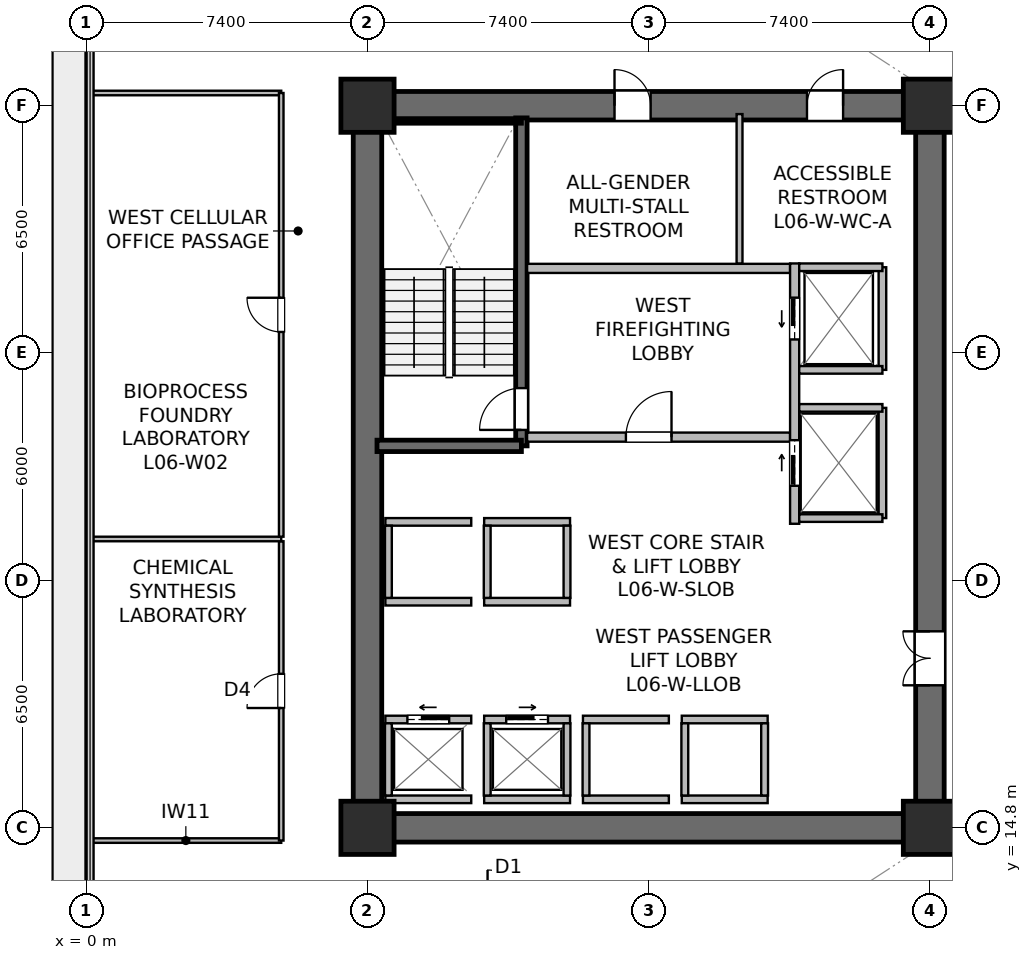
"""IFC4 building model, lengths in metres.
Left out: names, types, materials, properties, quantities, classifications, styles, units other than length and angle.
Written with IfcOpenShell. Run it as: python <this file> out.ifc"""

import sys

from ifc_helpers import new_model, si_unit, direction, frame, frame_2d, origin, origin_2d, place, context, subcontext, project, spatial, rectangle, extrude, source, transform, mapped, element, fill, save


model = new_model("IFC4")
c1 = context("Model", 3, precision=1e-05, world=origin(), true_north=direction((0.0, 1.0)))
c2 = subcontext(c1, "Body", "Model", "MODEL_VIEW")
j1 = project(units=[si_unit("LENGTHUNIT", "METRE"), si_unit("PLANEANGLEUNIT", "RADIAN")], contexts=[c1])
p1 = place(None, origin())
s1 = spatial("IfcSite", under=j1, at=p1, CompositionType="ELEMENT")
p2 = place(p1, origin())
s2 = spatial("IfcBuilding", under=s1, at=p2, CompositionType="ELEMENT")
p3 = place(p2, frame((0.0, 0.0, 25.2)))
s3 = spatial("IfcBuildingStorey", under=s2, at=p3, CompositionType="ELEMENT", Elevation=25.2)
p4 = place(p3, frame((7.025, 14.8, 0.0), z_axis=(0.0, 0.0, 1.0), x_axis=(1.0, 0.0, 0.0)))
e1 = element("IfcWall", 1, at=p4, inside=s3, PredefinedType="SHEAR", context=c2, shape_type="SweptSolid", body=[
    extrude(rectangle(XDim=15.55, YDim=0.75, at=frame_2d((7.775, 0.0))), origin(), (0.0, 0.0, 1.0), 3.78),
])
p5 = place(p3, frame((7.025, 33.8, 0.0), z_axis=(0.0, 0.0, 1.0), x_axis=(1.0, 0.0, 0.0)))
e2 = element("IfcWall", 2, at=p5, inside=s3, PredefinedType="SHEAR", context=c2, shape_type="SweptSolid", body=[
    extrude(rectangle(XDim=15.55, YDim=0.75, at=frame_2d((7.775, 0.0))), origin(), (0.0, 0.0, 1.0), 3.78),
])
p6 = place(p5, frame((6.875, 0.0, 0.0)))
e3 = element("IfcOpeningElement", 3, at=p6, cuts=e2, PredefinedType="OPENING", context=c2, shape_type="SweptSolid", body=[
    extrude(rectangle(XDim=0.95, YDim=2.15, at=frame_2d((0.475, 1.075))), frame((0.0, 0.385, 0.0), z_axis=(0.0, -1.0, 0.0), x_axis=(1.0, 0.0, 0.0)), (0.0, 0.0, 1.0), 0.77),
])
p7 = place(p5, frame((11.94, 0.0, 0.0)))
e4 = element("IfcOpeningElement", 4, at=p7, cuts=e2, PredefinedType="OPENING", context=c2, shape_type="SweptSolid", body=[
    extrude(rectangle(XDim=0.95, YDim=2.15, at=frame_2d((0.475, 1.075))), frame((0.0, 0.385, 0.0), z_axis=(0.0, -1.0, 0.0), x_axis=(1.0, 0.0, 0.0)), (0.0, 0.0, 1.0), 0.77),
])
p8 = place(p3, frame((7.4, 15.175, 0.0), z_axis=(0.0, 0.0, 1.0), x_axis=(0.0, 1.0, 0.0)))
e5 = element("IfcWall", 5, at=p8, inside=s3, PredefinedType="SHEAR", context=c2, shape_type="SweptSolid", body=[
    extrude(rectangle(XDim=18.25, YDim=0.75, at=frame_2d((9.125, 0.0))), origin(), (0.0, 0.0, 1.0), 3.78),
])
p9 = place(p3, frame((22.2, 15.175, 0.0), z_axis=(0.0, 0.0, 1.0), x_axis=(0.0, 1.0, 0.0)))
e6 = element("IfcWall", 6, at=p9, inside=s3, PredefinedType="SHEAR", context=c2, shape_type="SweptSolid", body=[
    extrude(rectangle(XDim=18.25, YDim=0.75, at=frame_2d((9.125, 0.0))), origin(), (0.0, 0.0, 1.0), 3.78),
])
p10 = place(p9, frame((3.375, 0.0, 0.0)))
e7 = element("IfcOpeningElement", 7, at=p10, cuts=e6, PredefinedType="OPENING", context=c2, shape_type="SweptSolid", body=[
    extrude(rectangle(XDim=1.42, YDim=2.2, at=frame_2d((0.71, 1.1))), frame((0.0, 0.385, 0.0), z_axis=(0.0, -1.0, 0.0), x_axis=(1.0, 0.0, 0.0)), (0.0, 0.0, 1.0), 0.77),
])
p11 = place(p3, frame((11.45, 24.85, 0.0), z_axis=(0.0, 0.0, 1.0), x_axis=(0.0, 1.0, 0.0)))
e8 = element("IfcWall", 8, at=p11, inside=s3, PredefinedType="SHEAR", context=c2, shape_type="SweptSolid", body=[
    extrude(rectangle(XDim=8.63, YDim=0.3, at=frame_2d((4.315, 0.0))), origin(), (0.0, 0.0, 1.0), 3.78),
])
p12 = place(p11, frame((0.42, 0.0, 0.0)))
e9 = element("IfcOpeningElement", 9, at=p12, cuts=e8, PredefinedType="OPENING", context=c2, shape_type="SweptSolid", body=[
    extrude(rectangle(XDim=1.1, YDim=2.15, at=frame_2d((0.55, 1.075))), frame((0.0, 0.16, 0.0), z_axis=(0.0, -1.0, 0.0), x_axis=(1.0, 0.0, 0.0)), (0.0, 0.0, 1.0), 0.32),
])
p13 = place(p3, frame((7.65, 24.85, 0.0), z_axis=(0.0, 0.0, 1.0), x_axis=(1.0, 0.0, 0.0)))
e10 = element("IfcWall", 10, at=p13, inside=s3, PredefinedType="SHEAR", context=c2, shape_type="SweptSolid", body=[
    extrude(rectangle(XDim=3.8, YDim=0.3, at=frame_2d((1.9, 0.0))), origin(), (0.0, 0.0, 1.0), 3.78),
])
p14 = place(p3, frame((7.73, 33.4, 0.0), z_axis=(0.0, 0.0, 1.0), x_axis=(1.0, 0.0, 0.0)))
e11 = element("IfcWall", 11, at=p14, inside=s3, PredefinedType="SOLIDWALL", context=c2, shape_type="SweptSolid", body=[
    extrude(rectangle(XDim=3.72, YDim=0.12, at=frame_2d((1.86, 0.0))), origin(), (0.0, 0.0, 1.0), 3.78),
])
m1 = source(origin(), c2, "Body", "SweptSolid", [
    extrude(rectangle(XDim=1.4, YDim=1.4, at=origin_2d()), origin(), (0.0, 0.0, 1.0), 4.1),
])
for number, where, z_axis, x_axis in (
    (12, (7.4, 14.8, 0.0), (0.0, 0.0, 1.0), (1.0, 0.0, 0.0)),
    (13, (22.2, 14.8, 0.0), (0.0, 0.0, 1.0), (1.0, 0.0, 0.0)),
    (14, (7.4, 33.8, 0.0), (0.0, 0.0, 1.0), (1.0, 0.0, 0.0)),
    (15, (22.2, 33.8, 0.0), (0.0, 0.0, 1.0), (1.0, 0.0, 0.0)),
):
    element("IfcColumn", number, at=place(p3, frame(where, z_axis=z_axis, x_axis=x_axis)), inside=s3, PredefinedType="COLUMN", context=c2, shape_type="MappedRepresentation", body=[
        mapped(m1, transform((0.0, 0.0, 0.0), scale=1.0)),
    ])
p15 = place(p3, frame((11.6, 25.08, 0.0), z_axis=(0.0, 0.0, 1.0), x_axis=(1.0, 0.0, 0.0)))
e16 = element("IfcWall", 16, at=p15, inside=s3, PredefinedType="SOLIDWALL", context=c2, shape_type="SweptSolid", body=[
    extrude(rectangle(XDim=6.92, YDim=0.24, at=frame_2d((3.46, 0.0))), origin(), (0.0, 0.0, 1.0), 3.065),
])
p16 = place(p15, frame((2.6, 0.0, 0.0)))
e17 = element("IfcOpeningElement", 17, at=p16, cuts=e16, PredefinedType="OPENING", context=c2, shape_type="SweptSolid", body=[
    extrude(rectangle(XDim=1.2, YDim=2.16, at=frame_2d((0.6, 1.08))), frame((0.0, 0.13, 0.0), z_axis=(0.0, -1.0, 0.0), x_axis=(1.0, 0.0, 0.0)), (0.0, 0.0, 1.0), 0.26),
])
p17 = place(p3, frame((11.6, 29.52, 0.0), z_axis=(0.0, 0.0, 1.0), x_axis=(1.0, 0.0, 0.0)))
e18 = element("IfcWall", 18, at=p17, inside=s3, PredefinedType="SOLIDWALL", context=c2, shape_type="SweptSolid", body=[
    extrude(rectangle(XDim=6.92, YDim=0.24, at=frame_2d((3.46, 0.0))), origin(), (0.0, 0.0, 1.0), 3.065),
])
p18 = place(p3, frame((18.64, 22.8, 0.0), z_axis=(0.0, 0.0, 1.0), x_axis=(0.0, 1.0, 0.0)))
e19 = element("IfcWall", 19, at=p18, inside=s3, PredefinedType="SOLIDWALL", context=c2, shape_type="SweptSolid", body=[
    extrude(rectangle(XDim=6.85, YDim=0.24, at=frame_2d((3.425, 0.0))), origin(), (0.0, 0.0, 1.0), 2.865),
])
p19 = place(p18, frame((4.85, 0.0, 0.0)))
e20 = element("IfcOpeningElement", 20, at=p19, cuts=e19, PredefinedType="OPENING", context=c2, shape_type="SweptSolid", body=[
    extrude(rectangle(XDim=1.1, YDim=2.22, at=frame_2d((0.55, 1.11))), frame((0.0, 0.13, 0.0), z_axis=(0.0, -1.0, 0.0), x_axis=(1.0, 0.0, 0.0)), (0.0, 0.0, 1.0), 0.26),
])
p20 = place(p18, frame((1.0, 0.0, 0.0)))
e21 = element("IfcOpeningElement", 21, at=p20, cuts=e19, PredefinedType="OPENING", context=c2, shape_type="SweptSolid", body=[
    extrude(rectangle(XDim=1.2, YDim=2.22, at=frame_2d((0.6, 1.11))), frame((0.0, 0.13, 0.0), z_axis=(0.0, -1.0, 0.0), x_axis=(1.0, 0.0, 0.0)), (0.0, 0.0, 1.0), 0.26),
])
p21 = place(p3, frame((7.87, 17.65, 0.0), z_axis=(0.0, 0.0, 1.0), x_axis=(1.0, 0.0, 0.0)))
e22 = element("IfcWall", 22, at=p21, inside=s3, PredefinedType="SOLIDWALL", context=c2, shape_type="SweptSolid", body=[
    extrude(rectangle(XDim=2.26, YDim=0.2, at=frame_2d((1.13, 0.0))), origin(), (0.0, 0.0, 1.0), 3.78),
])
p22 = place(p21, frame((0.58, 0.0, 0.0)))
e23 = element("IfcOpeningElement", 23, at=p22, cuts=e22, PredefinedType="OPENING", context=c2, shape_type="SweptSolid", body=[
    extrude(rectangle(XDim=1.1, YDim=2.22, at=frame_2d((0.55, 1.11))), frame((0.0, 0.11, 0.0), z_axis=(0.0, -1.0, 0.0), x_axis=(1.0, 0.0, 0.0)), (0.0, 0.0, 1.0), 0.22),
])
p23 = place(p3, frame((7.87, 15.55, 0.0), z_axis=(0.0, 0.0, 1.0), x_axis=(1.0, 0.0, 0.0)))
e24 = element("IfcWall", 24, at=p23, inside=s3, PredefinedType="SOLIDWALL", context=c2, shape_type="SweptSolid", body=[
    extrude(rectangle(XDim=2.26, YDim=0.2, at=frame_2d((1.13, 0.0))), origin(), (0.0, 0.0, 1.0), 3.78),
])
p24 = place(p3, frame((7.95, 15.65, 0.0), z_axis=(0.0, 0.0, 1.0), x_axis=(0.0, 1.0, 0.0)))
e25 = element("IfcWall", 25, at=p24, inside=s3, PredefinedType="SOLIDWALL", context=c2, shape_type="SweptSolid", body=[
    extrude(rectangle(XDim=1.9, YDim=0.18, at=frame_2d((0.95, 0.0))), origin(), (0.0, 0.0, 1.0), 3.78),
])
p25 = place(p3, frame((10.47, 17.65, 0.0), z_axis=(0.0, 0.0, 1.0), x_axis=(1.0, 0.0, 0.0)))
e26 = element("IfcWall", 26, at=p25, inside=s3, PredefinedType="SOLIDWALL", context=c2, shape_type="SweptSolid", body=[
    extrude(rectangle(XDim=2.26, YDim=0.2, at=frame_2d((1.13, 0.0))), origin(), (0.0, 0.0, 1.0), 3.78),
])
p26 = place(p25, frame((0.58, 0.0, 0.0)))
e27 = element("IfcOpeningElement", 27, at=p26, cuts=e26, PredefinedType="OPENING", context=c2, shape_type="SweptSolid", body=[
    extrude(rectangle(XDim=1.1, YDim=2.22, at=frame_2d((0.55, 1.11))), frame((0.0, 0.11, 0.0), z_axis=(0.0, -1.0, 0.0), x_axis=(1.0, 0.0, 0.0)), (0.0, 0.0, 1.0), 0.22),
])
p27 = place(p3, frame((10.47, 15.55, 0.0), z_axis=(0.0, 0.0, 1.0), x_axis=(1.0, 0.0, 0.0)))
e28 = element("IfcWall", 28, at=p27, inside=s3, PredefinedType="SOLIDWALL", context=c2, shape_type="SweptSolid", body=[
    extrude(rectangle(XDim=2.26, YDim=0.2, at=frame_2d((1.13, 0.0))), origin(), (0.0, 0.0, 1.0), 3.78),
])
for number, where, z_axis, x_axis in (
    (29, (10.55, 15.65, 0.0), (0.0, 0.0, 1.0), (0.0, 1.0, 0.0)),
    (30, (12.65, 15.65, 0.0), (0.0, 0.0, 1.0), (0.0, 1.0, 0.0)),
):
    element("IfcWall", number, at=place(p3, frame(where, z_axis=z_axis, x_axis=x_axis)), inside=s3, PredefinedType="SOLIDWALL", context=c2, shape_type="SweptSolid", body=[
        extrude(rectangle(XDim=1.9, YDim=0.18, at=frame_2d((0.95, 0.0))), origin(), (0.0, 0.0, 1.0), 3.78),
    ])
for number, where, z_axis, x_axis in (
    (31, (13.07, 17.65, 0.0), (0.0, 0.0, 1.0), (1.0, 0.0, 0.0)),
    (32, (13.07, 15.55, 0.0), (0.0, 0.0, 1.0), (1.0, 0.0, 0.0)),
):
    element("IfcWall", number, at=place(p3, frame(where, z_axis=z_axis, x_axis=x_axis)), inside=s3, PredefinedType="SOLIDWALL", context=c2, shape_type="SweptSolid", body=[
        extrude(rectangle(XDim=2.26, YDim=0.2, at=frame_2d((1.13, 0.0))), origin(), (0.0, 0.0, 1.0), 3.065),
    ])
p28 = place(p3, frame((13.15, 15.65, 0.0), z_axis=(0.0, 0.0, 1.0), x_axis=(0.0, 1.0, 0.0)))
e33 = element("IfcWall", 33, at=p28, inside=s3, PredefinedType="SOLIDWALL", context=c2, shape_type="SweptSolid", body=[
    extrude(rectangle(XDim=1.9, YDim=0.18, at=frame_2d((0.95, 0.0))), origin(), (0.0, 0.0, 1.0), 3.78),
])
for number, where, z_axis, x_axis in (
    (34, (15.67, 17.65, 0.0), (0.0, 0.0, 1.0), (1.0, 0.0, 0.0)),
    (35, (15.67, 15.55, 0.0), (0.0, 0.0, 1.0), (1.0, 0.0, 0.0)),
):
    element("IfcWall", number, at=place(p3, frame(where, z_axis=z_axis, x_axis=x_axis)), inside=s3, PredefinedType="SOLIDWALL", context=c2, shape_type="SweptSolid", body=[
        extrude(rectangle(XDim=2.26, YDim=0.2, at=frame_2d((1.13, 0.0))), origin(), (0.0, 0.0, 1.0), 3.78),
    ])
for number, where, z_axis, x_axis in (
    (36, (15.75, 15.65, 0.0), (0.0, 0.0, 1.0), (0.0, 1.0, 0.0)),
    (37, (17.85, 15.65, 0.0), (0.0, 0.0, 1.0), (0.0, 1.0, 0.0)),
):
    element("IfcWall", number, at=place(p3, frame(where, z_axis=z_axis, x_axis=x_axis)), inside=s3, PredefinedType="SOLIDWALL", context=c2, shape_type="SweptSolid", body=[
        extrude(rectangle(XDim=1.9, YDim=0.18, at=frame_2d((0.95, 0.0))), origin(), (0.0, 0.0, 1.0), 3.78),
    ])
for number, where, z_axis, x_axis in (
    (38, (7.87, 20.75, 0.0), (0.0, 0.0, 1.0), (1.0, 0.0, 0.0)),
    (39, (7.87, 22.85, 0.0), (0.0, 0.0, 1.0), (1.0, 0.0, 0.0)),
):
    element("IfcWall", number, at=place(p3, frame(where, z_axis=z_axis, x_axis=x_axis)), inside=s3, PredefinedType="SOLIDWALL", context=c2, shape_type="SweptSolid", body=[
        extrude(rectangle(XDim=2.26, YDim=0.2, at=frame_2d((1.13, 0.0))), origin(), (0.0, 0.0, 1.0), 3.78),
    ])
p29 = place(p3, frame((7.95, 20.85, 0.0), z_axis=(0.0, 0.0, 1.0), x_axis=(0.0, 1.0, 0.0)))
e40 = element("IfcWall", 40, at=p29, inside=s3, PredefinedType="SOLIDWALL", context=c2, shape_type="SweptSolid", body=[
    extrude(rectangle(XDim=1.9, YDim=0.18, at=frame_2d((0.95, 0.0))), origin(), (0.0, 0.0, 1.0), 3.78),
])
for number, where, z_axis, x_axis in (
    (41, (10.47, 20.75, 0.0), (0.0, 0.0, 1.0), (1.0, 0.0, 0.0)),
    (42, (10.47, 22.85, 0.0), (0.0, 0.0, 1.0), (1.0, 0.0, 0.0)),
):
    element("IfcWall", number, at=place(p3, frame(where, z_axis=z_axis, x_axis=x_axis)), inside=s3, PredefinedType="SOLIDWALL", context=c2, shape_type="SweptSolid", body=[
        extrude(rectangle(XDim=2.26, YDim=0.2, at=frame_2d((1.13, 0.0))), origin(), (0.0, 0.0, 1.0), 3.78),
    ])
for number, where, z_axis, x_axis in (
    (43, (10.55, 20.85, 0.0), (0.0, 0.0, 1.0), (0.0, 1.0, 0.0)),
    (44, (12.65, 20.85, 0.0), (0.0, 0.0, 1.0), (0.0, 1.0, 0.0)),
):
    element("IfcWall", number, at=place(p3, frame(where, z_axis=z_axis, x_axis=x_axis)), inside=s3, PredefinedType="SOLIDWALL", context=c2, shape_type="SweptSolid", body=[
        extrude(rectangle(XDim=1.9, YDim=0.18, at=frame_2d((0.95, 0.0))), origin(), (0.0, 0.0, 1.0), 3.78),
    ])
p30 = place(p3, frame((20.95, 26.85, 0.0), z_axis=(0.0, 0.0, 1.0), x_axis=(0.0, 1.0, 0.0)))
e45 = element("IfcWall", 45, at=p30, inside=s3, PredefinedType="SOLIDWALL", context=c2, shape_type="SweptSolid", body=[
    extrude(rectangle(XDim=2.7, YDim=0.2, at=frame_2d((1.35, 0.0))), origin(), (0.0, 0.0, 1.0), 3.78),
])
p31 = place(p3, frame((18.76, 29.55, 0.0), z_axis=(0.0, 0.0, 1.0), x_axis=(1.0, 0.0, 0.0)))
e46 = element("IfcWall", 46, at=p31, inside=s3, PredefinedType="SOLIDWALL", context=c2, shape_type="SweptSolid", body=[
    extrude(rectangle(XDim=2.19, YDim=0.2, at=frame_2d((1.095, 0.0))), origin(), (0.0, 0.0, 1.0), 3.78),
])
p32 = place(p3, frame((18.76, 26.85, 0.0), z_axis=(0.0, 0.0, 1.0), x_axis=(1.0, 0.0, 0.0)))
e47 = element("IfcWall", 47, at=p32, inside=s3, PredefinedType="SOLIDWALL", context=c2, shape_type="SweptSolid", body=[
    extrude(rectangle(XDim=2.19, YDim=0.2, at=frame_2d((1.095, 0.0))), origin(), (0.0, 0.0, 1.0), 3.177),
])
p33 = place(p3, frame((20.95, 22.95, 0.0), z_axis=(0.0, 0.0, 1.0), x_axis=(0.0, 1.0, 0.0)))
e48 = element("IfcWall", 48, at=p33, inside=s3, PredefinedType="SOLIDWALL", context=c2, shape_type="SweptSolid", body=[
    extrude(rectangle(XDim=2.9, YDim=0.2, at=frame_2d((1.45, 0.0))), origin(), (0.0, 0.0, 1.0), 2.865),
])
for number, where, z_axis, x_axis in (
    (49, (18.76, 25.85, 0.0), (0.0, 0.0, 1.0), (1.0, 0.0, 0.0)),
    (50, (18.76, 22.95, 0.0), (0.0, 0.0, 1.0), (1.0, 0.0, 0.0)),
):
    element("IfcWall", number, at=place(p3, frame(where, z_axis=z_axis, x_axis=x_axis)), inside=s3, PredefinedType="SOLIDWALL", context=c2, shape_type="SweptSolid", body=[
        extrude(rectangle(XDim=2.19, YDim=0.2, at=frame_2d((1.095, 0.0))), origin(), (0.0, 0.0, 1.0), 3.78),
    ])
p34 = place(p3, frame((17.19, 29.65, 0.0), z_axis=(0.0, 0.0, 1.0), x_axis=(0.0, 1.0, 0.0)))
e51 = element("IfcWall", 51, at=p34, inside=s3, PredefinedType="PLUMBINGWALL", context=c2, shape_type="SweptSolid", body=[
    extrude(rectangle(XDim=3.93, YDim=0.155, at=frame_2d((1.965, 0.0))), origin(), (0.0, 0.0, 1.0), 3.78),
])
for number, where, z_axis, x_axis in (
    (52, (0.11, 14.465, 0.0), (0.0, 0.0, 1.0), (1.0, 0.0, 0.0)),
    (53, (0.11, 34.135, 0.0), (0.0, 0.0, 1.0), (1.0, 0.0, 0.0)),
):
    element("IfcWall", number, at=place(p3, frame(where, z_axis=z_axis, x_axis=x_axis)), inside=s3, PredefinedType="PARTITIONING", context=c2, shape_type="SweptSolid", body=[
        extrude(rectangle(XDim=5.02, YDim=0.12, at=frame_2d((2.51, 0.0))), origin(), (0.0, 0.0, 1.0), 3.78),
    ])
p35 = place(p3, frame((5.13, 14.465, 0.0), z_axis=(0.0, 0.0, 1.0), x_axis=(0.0, 1.0, 0.0)))
e54 = element("IfcWall", 54, at=p35, inside=s3, PredefinedType="PARTITIONING", context=c2, shape_type="SweptSolid", body=[
    extrude(rectangle(XDim=7.875, YDim=0.12, at=frame_2d((3.938, 0.0))), origin(), (0.0, 0.0, 1.0), 3.78),
])
p36 = place(p35, frame((3.488, 0.0, 0.0)))
e55 = element("IfcOpeningElement", 55, at=p36, cuts=e54, PredefinedType="OPENING", context=c2, shape_type="SweptSolid", body=[
    extrude(rectangle(XDim=0.9, YDim=2.1, at=frame_2d((0.45, 1.05))), frame((0.0, 0.07, 0.0), z_axis=(0.0, -1.0, 0.0), x_axis=(1.0, 0.0, 0.0)), (0.0, 0.0, 1.0), 0.14),
])
p37 = place(p3, frame((0.11, 22.4, 0.0), z_axis=(0.0, 0.0, 1.0), x_axis=(1.0, 0.0, 0.0)))
e56 = element("IfcWall", 56, at=p37, inside=s3, PredefinedType="PARTITIONING", context=c2, shape_type="SweptSolid", body=[
    extrude(rectangle(XDim=5.02, YDim=0.12, at=frame_2d((2.51, 0.0))), origin(), (0.0, 0.0, 1.0), 3.78),
])
p38 = place(p3, frame((5.13, 22.46, 0.0), z_axis=(0.0, 0.0, 1.0), x_axis=(0.0, 1.0, 0.0)))
e57 = element("IfcWall", 57, at=p38, inside=s3, PredefinedType="PARTITIONING", context=c2, shape_type="SweptSolid", body=[
    extrude(rectangle(XDim=11.675, YDim=0.12, at=frame_2d((5.837, 0.0))), origin(), (0.0, 0.0, 1.0), 3.78),
])
p39 = place(p38, frame((5.387, 0.0, 0.0)))
e58 = element("IfcOpeningElement", 58, at=p39, cuts=e57, PredefinedType="OPENING", context=c2, shape_type="SweptSolid", body=[
    extrude(rectangle(XDim=0.9, YDim=2.1, at=frame_2d((0.45, 1.05))), frame((0.0, 0.07, 0.0), z_axis=(0.0, -1.0, 0.0), x_axis=(1.0, 0.0, 0.0)), (0.0, 0.0, 1.0), 0.14),
])
m2 = source(origin(), c2, "Body", "SweptSolid", [
    extrude(rectangle(XDim=1.1, YDim=2.15, at=frame_2d((0.55, 1.075))), frame((0.0, 0.025, 0.0), z_axis=(0.0, -1.0, 0.0), x_axis=(1.0, 0.0, 0.0)), (0.0, 0.0, 1.0), 0.05),
])
p40 = place(p12, origin())
e59 = element("IfcDoor", 59, at=p40, inside=s3, OperationType="SINGLE_SWING_LEFT", PredefinedType="DOOR", context=c2, shape_type="MappedRepresentation", body=[
    mapped(m2, transform((0.0, 0.0, 0.0), scale=1.0)),
])
fill(e9, e59)
m3 = source(origin(), c2, "Body", "SweptSolid", [
    extrude(rectangle(XDim=1.2, YDim=2.16, at=frame_2d((0.6, 1.08))), frame((0.0, 0.025, 0.0), z_axis=(0.0, -1.0, 0.0), x_axis=(1.0, 0.0, 0.0)), (0.0, 0.0, 1.0), 0.05),
])
p41 = place(p16, origin())
e60 = element("IfcDoor", 60, at=p41, inside=s3, OperationType="SINGLE_SWING_RIGHT", PredefinedType="DOOR", context=c2, shape_type="MappedRepresentation", body=[
    mapped(m3, transform((0.0, 0.0, 0.0), scale=1.0)),
])
fill(e17, e60)
m4 = source(origin(), c2, "Body", "SweptSolid", [
    extrude(rectangle(XDim=1.1, YDim=2.22, at=frame_2d((0.55, 1.11))), frame((0.0, 0.025, 0.0), z_axis=(0.0, -1.0, 0.0), x_axis=(1.0, 0.0, 0.0)), (0.0, 0.0, 1.0), 0.05),
])
p42 = place(p22, origin())
e61 = element("IfcDoor", 61, at=p42, inside=s3, OperationType="SLIDING_TO_LEFT", PredefinedType="USERDEFINED", context=c2, shape_type="MappedRepresentation", body=[
    mapped(m4, transform((0.0, 0.0, 0.0), scale=1.0)),
])
fill(e23, e61)
p43 = place(p26, origin())
e62 = element("IfcDoor", 62, at=p43, inside=s3, OperationType="SLIDING_TO_RIGHT", PredefinedType="USERDEFINED", context=c2, shape_type="MappedRepresentation", body=[
    mapped(m4, transform((0.0, 0.0, 0.0), scale=1.0)),
])
fill(e27, e62)
p44 = place(p19, origin())
e63 = element("IfcDoor", 63, at=p44, inside=s3, OperationType="SLIDING_TO_LEFT", PredefinedType="USERDEFINED", context=c2, shape_type="MappedRepresentation", body=[
    mapped(m4, transform((0.0, 0.0, 0.0), scale=1.0)),
])
fill(e20, e63)
m5 = source(origin(), c2, "Body", "SweptSolid", [
    extrude(rectangle(XDim=1.2, YDim=2.22, at=frame_2d((0.6, 1.11))), frame((0.0, 0.025, 0.0), z_axis=(0.0, -1.0, 0.0), x_axis=(1.0, 0.0, 0.0)), (0.0, 0.0, 1.0), 0.05),
])
p45 = place(p20, origin())
e64 = element("IfcDoor", 64, at=p45, inside=s3, OperationType="SLIDING_TO_RIGHT", PredefinedType="USERDEFINED", context=c2, shape_type="MappedRepresentation", body=[
    mapped(m5, transform((0.0, 0.0, 0.0), scale=1.0)),
])
fill(e21, e64)
m6 = source(origin(), c2, "Body", "SweptSolid", [
    extrude(rectangle(XDim=1.42, YDim=2.2, at=frame_2d((0.71, 1.1))), frame((0.0, 0.025, 0.0), z_axis=(0.0, -1.0, 0.0), x_axis=(1.0, 0.0, 0.0)), (0.0, 0.0, 1.0), 0.05),
])
p46 = place(p10, origin())
e65 = element("IfcDoor", 65, at=p46, inside=s3, OperationType="DOUBLE_DOOR_SINGLE_SWING", PredefinedType="DOOR", context=c2, shape_type="MappedRepresentation", body=[
    mapped(m6, transform((0.0, 0.0, 0.0), scale=1.0)),
])
fill(e7, e65)
m7 = source(origin(), c2, "Body", "SweptSolid", [
    extrude(rectangle(XDim=0.95, YDim=2.15, at=frame_2d((0.475, 1.075))), frame((0.0, 0.025, 0.0), z_axis=(0.0, -1.0, 0.0), x_axis=(1.0, 0.0, 0.0)), (0.0, 0.0, 1.0), 0.05),
])
p47 = place(p6, origin())
e66 = element("IfcDoor", 66, at=p47, inside=s3, OperationType="SINGLE_SWING_LEFT", PredefinedType="DOOR", context=c2, shape_type="MappedRepresentation", body=[
    mapped(m7, transform((0.0, 0.0, 0.0), scale=1.0)),
])
fill(e3, e66)
p48 = place(p7, origin())
e67 = element("IfcDoor", 67, at=p48, inside=s3, OperationType="SINGLE_SWING_RIGHT", PredefinedType="DOOR", context=c2, shape_type="MappedRepresentation", body=[
    mapped(m7, transform((0.0, 0.0, 0.0), scale=1.0)),
])
fill(e4, e67)
m8 = source(origin(), c2, "Body", "SweptSolid", [
    extrude(rectangle(XDim=0.9, YDim=2.1, at=frame_2d((0.45, 1.05))), frame((0.0, 0.025, 0.0), z_axis=(0.0, -1.0, 0.0), x_axis=(1.0, 0.0, 0.0)), (0.0, 0.0, 1.0), 0.05),
])
p49 = place(p36, origin())
e68 = element("IfcDoor", 68, at=p49, inside=s3, OperationType="SINGLE_SWING_LEFT", PredefinedType="DOOR", context=c2, shape_type="MappedRepresentation", body=[
    mapped(m8, transform((0.0, 0.0, 0.0), scale=1.0)),
])
fill(e55, e68)
p50 = place(p39, origin())
e69 = element("IfcDoor", 69, at=p50, inside=s3, OperationType="SINGLE_SWING_RIGHT", PredefinedType="DOOR", context=c2, shape_type="MappedRepresentation", body=[
    mapped(m8, transform((0.0, 0.0, 0.0), scale=1.0)),
])
fill(e58, e69)
save(model, sys.argv[1])
